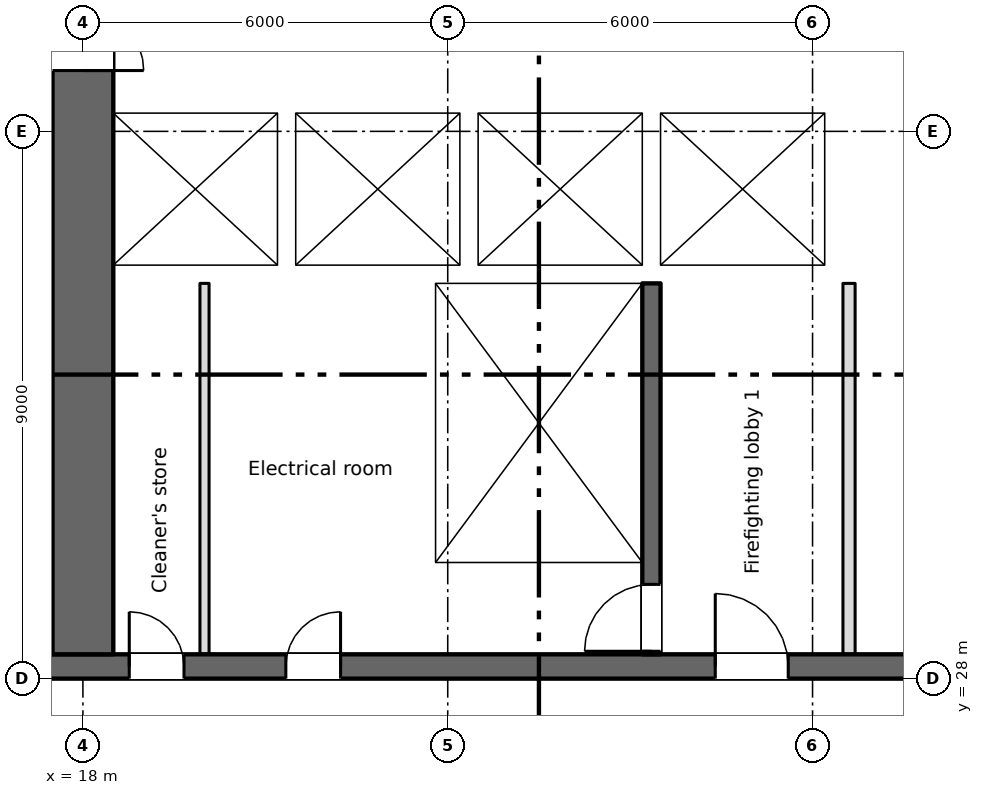
"""IFC4 building model, lengths in metres.
Left out: names, types, materials, properties, quantities, classifications, styles, units other than length and angle.
Written with IfcOpenShell. Run it as: python <this file> out.ifc"""

import sys

from ifc_helpers import new_model, si_unit, direction, frame, frame_2d, origin, place, context, subcontext, project, spatial, rectangle, extrude, element, fill, save


model = new_model("IFC4")
c1 = context("Model", 3, precision=1e-05, world=origin(), true_north=direction((0.0, 1.0)))
c2 = subcontext(c1, "Body", "Model", "MODEL_VIEW")
j1 = project(units=[si_unit("LENGTHUNIT", "METRE"), si_unit("PLANEANGLEUNIT", "RADIAN")], contexts=[c1])
p1 = place(None, origin())
s1 = spatial("IfcSite", under=j1, at=p1, CompositionType="ELEMENT")
p2 = place(p1, origin())
s2 = spatial("IfcBuilding", under=s1, at=p2, CompositionType="ELEMENT")
p3 = place(p2, frame((0.0, 0.0, 78.75)))
s3 = spatial("IfcBuildingStorey", under=s2, at=p3, CompositionType="ELEMENT", Elevation=78.75)
p4 = place(p3, frame((6.7, 28.2, 0.0), z_axis=(0.0, 0.0, 1.0), x_axis=(1.0, 0.0, 0.0)))
e1 = element("IfcWall", 1, at=p4, inside=s3, PredefinedType="SHEAR", context=c2, shape_type="SweptSolid", body=[
    extrude(rectangle(XDim=57.8, YDim=0.4, at=frame_2d((28.9, 0.0))), origin(), (0.0, 0.0, 1.0), 3.35),
])
p5 = place(p4, frame((12.062, 0.0, 0.0)))
e2 = element("IfcOpeningElement", 2, at=p5, cuts=e1, PredefinedType="OPENING", context=c2, shape_type="SweptSolid", body=[
    extrude(rectangle(XDim=0.9, YDim=2.1, at=frame_2d((0.45, 1.05))), frame((0.0, 0.21, 0.0), z_axis=(0.0, -1.0, 0.0), x_axis=(1.0, 0.0, 0.0)), (0.0, 0.0, 1.0), 0.42),
])
p6 = place(p4, frame((14.637, 0.0, 0.0)))
e3 = element("IfcOpeningElement", 3, at=p6, cuts=e1, PredefinedType="OPENING", context=c2, shape_type="SweptSolid", body=[
    extrude(rectangle(XDim=0.9, YDim=2.1, at=frame_2d((0.45, 1.05))), frame((0.0, 0.21, 0.0), z_axis=(0.0, -1.0, 0.0), x_axis=(1.0, 0.0, 0.0)), (0.0, 0.0, 1.0), 0.42),
])
p7 = place(p4, frame((49.062, 0.0, 0.0)))
e4 = element("IfcOpeningElement", 4, at=p7, cuts=e1, PredefinedType="OPENING", context=c2, shape_type="SweptSolid", body=[
    extrude(rectangle(XDim=0.9, YDim=2.1, at=frame_2d((0.45, 1.05))), frame((0.0, 0.21, 0.0), z_axis=(0.0, -1.0, 0.0), x_axis=(1.0, 0.0, 0.0)), (0.0, 0.0, 1.0), 0.42),
])
p8 = place(p4, frame((51.637, 0.0, 0.0)))
e5 = element("IfcOpeningElement", 5, at=p8, cuts=e1, PredefinedType="OPENING", context=c2, shape_type="SweptSolid", body=[
    extrude(rectangle(XDim=0.9, YDim=2.1, at=frame_2d((0.45, 1.05))), frame((0.0, 0.21, 0.0), z_axis=(0.0, -1.0, 0.0), x_axis=(1.0, 0.0, 0.0)), (0.0, 0.0, 1.0), 0.42),
])
p9 = place(p4, frame((1.35, 0.0, 0.0)))
e6 = element("IfcOpeningElement", 6, at=p9, cuts=e1, PredefinedType="OPENING", context=c2, shape_type="SweptSolid", body=[
    extrude(rectangle(XDim=0.9, YDim=2.1, at=frame_2d((0.45, 1.05))), frame((0.0, 0.21, 0.0), z_axis=(0.0, -1.0, 0.0), x_axis=(1.0, 0.0, 0.0)), (0.0, 0.0, 1.0), 0.42),
])
p10 = place(p4, frame((4.7, 0.0, 0.0)))
e7 = element("IfcOpeningElement", 7, at=p10, cuts=e1, PredefinedType="OPENING", context=c2, shape_type="SweptSolid", body=[
    extrude(rectangle(XDim=1.2, YDim=2.1, at=frame_2d((0.6, 1.05))), frame((0.0, 0.21, 0.0), z_axis=(0.0, -1.0, 0.0), x_axis=(1.0, 0.0, 0.0)), (0.0, 0.0, 1.0), 0.42),
])
p11 = place(p4, frame((31.7, 0.0, 0.0)))
e8 = element("IfcOpeningElement", 8, at=p11, cuts=e1, PredefinedType="OPENING", context=c2, shape_type="SweptSolid", body=[
    extrude(rectangle(XDim=1.2, YDim=2.1, at=frame_2d((0.6, 1.05))), frame((0.0, 0.21, 0.0), z_axis=(0.0, -1.0, 0.0), x_axis=(1.0, 0.0, 0.0)), (0.0, 0.0, 1.0), 0.42),
])
p12 = place(p4, frame((55.2, 0.0, 0.0)))
e9 = element("IfcOpeningElement", 9, at=p12, cuts=e1, PredefinedType="OPENING", context=c2, shape_type="SweptSolid", body=[
    extrude(rectangle(XDim=1.2, YDim=2.1, at=frame_2d((0.6, 1.05))), frame((0.0, 0.21, 0.0), z_axis=(0.0, -1.0, 0.0), x_axis=(1.0, 0.0, 0.0)), (0.0, 0.0, 1.0), 0.42),
])
p13 = place(p4, frame((21.7, 0.0, 0.0)))
e10 = element("IfcOpeningElement", 10, at=p13, cuts=e1, PredefinedType="OPENING", context=c2, shape_type="SweptSolid", body=[
    extrude(rectangle(XDim=1.2, YDim=2.1, at=frame_2d((0.6, 1.05))), frame((0.0, 0.21, 0.0), z_axis=(0.0, -1.0, 0.0), x_axis=(1.0, 0.0, 0.0)), (0.0, 0.0, 1.0), 0.42),
])
p14 = place(p4, frame((41.7, 0.0, 0.0)))
e11 = element("IfcOpeningElement", 11, at=p14, cuts=e1, PredefinedType="OPENING", context=c2, shape_type="SweptSolid", body=[
    extrude(rectangle(XDim=1.2, YDim=2.1, at=frame_2d((0.6, 1.05))), frame((0.0, 0.21, 0.0), z_axis=(0.0, -1.0, 0.0), x_axis=(1.0, 0.0, 0.0)), (0.0, 0.0, 1.0), 0.42),
])
p15 = place(p4, frame((24.85, 0.0, 0.0)))
e12 = element("IfcOpeningElement", 12, at=p15, cuts=e1, PredefinedType="OPENING", context=c2, shape_type="SweptSolid", body=[
    extrude(rectangle(XDim=2.4, YDim=2.1, at=frame_2d((1.2, 1.05))), frame((0.0, 0.21, 0.0), z_axis=(0.0, -1.0, 0.0), x_axis=(1.0, 0.0, 0.0)), (0.0, 0.0, 1.0), 0.42),
])
p16 = place(p4, frame((37.35, 0.0, 0.0)))
e13 = element("IfcOpeningElement", 13, at=p16, cuts=e1, PredefinedType="OPENING", context=c2, shape_type="SweptSolid", body=[
    extrude(rectangle(XDim=2.4, YDim=2.1, at=frame_2d((1.2, 1.05))), frame((0.0, 0.21, 0.0), z_axis=(0.0, -1.0, 0.0), x_axis=(1.0, 0.0, 0.0)), (0.0, 0.0, 1.0), 0.42),
])
p17 = place(p4, frame((7.85, 0.0, 0.0)))
e14 = element("IfcOpeningElement", 14, at=p17, cuts=e1, PredefinedType="OPENING", context=c2, shape_type="SweptSolid", body=[
    extrude(rectangle(XDim=2.4, YDim=2.1, at=frame_2d((1.2, 1.05))), frame((0.0, 0.21, 0.0), z_axis=(0.0, -1.0, 0.0), x_axis=(1.0, 0.0, 0.0)), (0.0, 0.0, 1.0), 0.42),
])
p18 = place(p4, frame((28.85, 0.0, 0.0)))
e15 = element("IfcOpeningElement", 15, at=p18, cuts=e1, PredefinedType="OPENING", context=c2, shape_type="SweptSolid", body=[
    extrude(rectangle(XDim=0.9, YDim=2.1, at=frame_2d((0.45, 1.05))), frame((0.0, 0.21, 0.0), z_axis=(0.0, -1.0, 0.0), x_axis=(1.0, 0.0, 0.0)), (0.0, 0.0, 1.0), 0.42),
])
p19 = place(p4, frame((34.85, 0.0, 0.0)))
e16 = element("IfcOpeningElement", 16, at=p19, cuts=e1, PredefinedType="OPENING", context=c2, shape_type="SweptSolid", body=[
    extrude(rectangle(XDim=0.9, YDim=2.1, at=frame_2d((0.45, 1.05))), frame((0.0, 0.21, 0.0), z_axis=(0.0, -1.0, 0.0), x_axis=(1.0, 0.0, 0.0)), (0.0, 0.0, 1.0), 0.42),
])
p20 = place(p3, frame((18.0, 28.4, 0.0), z_axis=(0.0, 0.0, 1.0), x_axis=(0.0, 1.0, 0.0)))
e17 = element("IfcWall", 17, at=p20, inside=s3, PredefinedType="SHEAR", context=c2, shape_type="SweptSolid", body=[
    extrude(rectangle(XDim=16.6, YDim=1.0, at=frame_2d((8.3, 0.0))), origin(), (0.0, 0.0, 1.0), 3.35),
])
p21 = place(p20, frame((9.6, 0.0, 0.0)))
e18 = element("IfcOpeningElement", 18, at=p21, cuts=e17, PredefinedType="OPENING", context=c2, shape_type="SweptSolid", body=[
    extrude(rectangle(XDim=2.0, YDim=2.1, at=frame_2d((1.0, 1.05))), frame((0.0, 0.51, 0.0), z_axis=(0.0, -1.0, 0.0), x_axis=(1.0, 0.0, 0.0)), (0.0, 0.0, 1.0), 1.02),
])
p22 = place(p20, frame((15.25, 0.0, 0.0)))
e19 = element("IfcOpeningElement", 19, at=p22, cuts=e17, PredefinedType="OPENING", context=c2, shape_type="SweptSolid", body=[
    extrude(rectangle(XDim=1.2, YDim=2.1, at=frame_2d((0.6, 1.05))), frame((0.0, 0.51, 0.0), z_axis=(0.0, -1.0, 0.0), x_axis=(1.0, 0.0, 0.0)), (0.0, 0.0, 1.0), 1.02),
])
p23 = place(p3, frame((23.65, 28.4, 0.0), z_axis=(0.0, 0.0, 1.0), x_axis=(0.0, 1.0, 0.0)))
e20 = element("IfcWall", 20, at=p23, inside=s3, PredefinedType="SHEAR", context=c2, shape_type="SweptSolid", body=[
    extrude(rectangle(XDim=6.1, YDim=0.3, at=frame_2d((3.05, 0.0))), origin(), (0.0, 0.0, 1.0), 3.35),
])
p24 = place(p3, frame((27.35, 28.4, 0.0), z_axis=(0.0, 0.0, 1.0), x_axis=(0.0, 1.0, 0.0)))
e21 = element("IfcWall", 21, at=p24, inside=s3, PredefinedType="SHEAR", context=c2, shape_type="SweptSolid", body=[
    extrude(rectangle(XDim=6.1, YDim=0.3, at=frame_2d((3.05, 0.0))), origin(), (0.0, 0.0, 1.0), 3.35),
])
p25 = place(p24, frame((0.05, 0.0, 0.0)))
e22 = element("IfcOpeningElement", 22, at=p25, cuts=e21, PredefinedType="OPENING", context=c2, shape_type="SweptSolid", body=[
    extrude(rectangle(XDim=1.1, YDim=2.1, at=frame_2d((0.55, 1.05))), frame((0.0, 0.16, 0.0), z_axis=(0.0, -1.0, 0.0), x_axis=(1.0, 0.0, 0.0)), (0.0, 0.0, 1.0), 0.32),
])
p26 = place(p3, frame((18.5, 34.65, 0.0), z_axis=(0.0, 0.0, 1.0), x_axis=(1.0, 0.0, 0.0)))
e23 = element("IfcWall", 23, at=p26, inside=s3, PredefinedType="SHEAR", context=c2, shape_type="SweptSolid", body=[
    extrude(rectangle(XDim=12.2, YDim=0.3, at=frame_2d((6.1, 0.0))), origin(), (0.0, 0.0, 1.0), 3.35),
])
p27 = place(p26, frame((9.8, 0.0, 0.0)))
e24 = element("IfcOpeningElement", 24, at=p27, cuts=e23, PredefinedType="OPENING", context=c2, shape_type="SweptSolid", body=[
    extrude(rectangle(XDim=1.1, YDim=2.1, at=frame_2d((0.55, 1.05))), frame((0.0, 0.16, 0.0), z_axis=(0.0, -1.0, 0.0), x_axis=(1.0, 0.0, 0.0)), (0.0, 0.0, 1.0), 0.32),
])
p28 = place(p3, frame((18.5, 37.45, 0.0), z_axis=(0.0, 0.0, 1.0), x_axis=(1.0, 0.0, 0.0)))
e25 = element("IfcWall", 25, at=p28, inside=s3, PredefinedType="SHEAR", context=c2, shape_type="SweptSolid", body=[
    extrude(rectangle(XDim=12.2, YDim=0.3, at=frame_2d((6.1, 0.0))), origin(), (0.0, 0.0, 1.0), 3.35),
])
p29 = place(p28, frame((0.8, 0.0, 0.0)))
e26 = element("IfcOpeningElement", 26, at=p29, cuts=e25, PredefinedType="OPENING", context=c2, shape_type="SweptSolid", body=[
    extrude(rectangle(XDim=1.1, YDim=2.1, at=frame_2d((0.55, 1.05))), frame((0.0, 0.16, 0.0), z_axis=(0.0, -1.0, 0.0), x_axis=(1.0, 0.0, 0.0)), (0.0, 0.0, 1.0), 0.32),
])
p30 = place(p28, frame((3.8, 0.0, 0.0)))
e27 = element("IfcOpeningElement", 27, at=p30, cuts=e25, PredefinedType="OPENING", context=c2, shape_type="SweptSolid", body=[
    extrude(rectangle(XDim=1.1, YDim=2.1, at=frame_2d((0.55, 1.05))), frame((0.0, 0.16, 0.0), z_axis=(0.0, -1.0, 0.0), x_axis=(1.0, 0.0, 0.0)), (0.0, 0.0, 1.0), 0.32),
])
p31 = place(p28, frame((6.8, 0.0, 0.0)))
e28 = element("IfcOpeningElement", 28, at=p31, cuts=e25, PredefinedType="OPENING", context=c2, shape_type="SweptSolid", body=[
    extrude(rectangle(XDim=1.1, YDim=2.1, at=frame_2d((0.55, 1.05))), frame((0.0, 0.16, 0.0), z_axis=(0.0, -1.0, 0.0), x_axis=(1.0, 0.0, 0.0)), (0.0, 0.0, 1.0), 0.32),
])
p32 = place(p3, frame((27.35, 34.8, 0.0), z_axis=(0.0, 0.0, 1.0), x_axis=(0.0, 1.0, 0.0)))
e29 = element("IfcWall", 29, at=p32, inside=s3, PredefinedType="SHEAR", context=c2, shape_type="SweptSolid", body=[
    extrude(rectangle(XDim=2.5, YDim=0.3, at=frame_2d((1.25, 0.0))), origin(), (0.0, 0.0, 1.0), 3.35),
])
p33 = place(p3, frame((30.45, 34.8, 0.0), z_axis=(0.0, 0.0, 1.0), x_axis=(0.0, 1.0, 0.0)))
e30 = element("IfcWall", 30, at=p33, inside=s3, PredefinedType="SHEAR", context=c2, shape_type="SweptSolid", body=[
    extrude(rectangle(XDim=2.5, YDim=0.5, at=frame_2d((1.25, 0.0))), origin(), (0.0, 0.0, 1.0), 3.35),
])
for number, where, z_axis, x_axis in (
    (31, (21.35, 34.8, 0.0), (0.0, 0.0, 1.0), (0.0, 1.0, 0.0)),
    (32, (24.35, 34.8, 0.0), (0.0, 0.0, 1.0), (0.0, 1.0, 0.0)),
):
    element("IfcWall", number, at=place(p3, frame(where, z_axis=z_axis, x_axis=x_axis)), inside=s3, PredefinedType="SHEAR", context=c2, shape_type="SweptSolid", body=[
        extrude(rectangle(XDim=2.5, YDim=0.3, at=frame_2d((1.25, 0.0))), origin(), (0.0, 0.0, 1.0), 3.35),
    ])
p34 = place(p3, frame((30.6, 28.4, 0.0), z_axis=(0.0, 0.0, 1.0), x_axis=(0.0, 1.0, 0.0)))
e33 = element("IfcWall", 33, at=p34, inside=s3, PredefinedType="PARTITIONING", context=c2, shape_type="SweptSolid", body=[
    extrude(rectangle(XDim=6.1, YDim=0.2, at=frame_2d((3.05, 0.0))), origin(), (0.0, 0.0, 1.0), 3.35),
])
p35 = place(p3, frame((20.0, 28.4, 0.0), z_axis=(0.0, 0.0, 1.0), x_axis=(0.0, 1.0, 0.0)))
e34 = element("IfcWall", 34, at=p35, inside=s3, PredefinedType="PARTITIONING", context=c2, shape_type="SweptSolid", body=[
    extrude(rectangle(XDim=6.1, YDim=0.15, at=frame_2d((3.05, 0.0))), origin(), (0.0, 0.0, 1.0), 3.35),
])
p36 = place(p5, origin())
e35 = element("IfcDoor", 35, at=p36, inside=s3, OperationType="SINGLE_SWING_LEFT", PredefinedType="DOOR", context=c2, shape_type="SweptSolid", body=[
    extrude(rectangle(XDim=0.9, YDim=2.1, at=frame_2d((0.45, 1.05))), frame((0.0, 0.025, 0.0), z_axis=(0.0, -1.0, 0.0), x_axis=(1.0, 0.0, 0.0)), (0.0, 0.0, 1.0), 0.05),
])
fill(e2, e35)
p37 = place(p6, origin())
e36 = element("IfcDoor", 36, at=p37, inside=s3, OperationType="SINGLE_SWING_RIGHT", PredefinedType="DOOR", context=c2, shape_type="SweptSolid", body=[
    extrude(rectangle(XDim=0.9, YDim=2.1, at=frame_2d((0.45, 1.05))), frame((0.0, 0.025, 0.0), z_axis=(0.0, -1.0, 0.0), x_axis=(1.0, 0.0, 0.0)), (0.0, 0.0, 1.0), 0.05),
])
fill(e3, e36)
p38 = place(p29, origin())
e37 = element("IfcDoor", 37, at=p38, inside=s3, OperationType="SLIDING_TO_LEFT", PredefinedType="DOOR", context=c2, shape_type="SweptSolid", body=[
    extrude(rectangle(XDim=1.1, YDim=2.1, at=frame_2d((0.55, 1.05))), frame((0.0, 0.025, 0.0), z_axis=(0.0, -1.0, 0.0), x_axis=(1.0, 0.0, 0.0)), (0.0, 0.0, 1.0), 0.05),
])
fill(e26, e37)
p39 = place(p30, origin())
e38 = element("IfcDoor", 38, at=p39, inside=s3, OperationType="SLIDING_TO_LEFT", PredefinedType="DOOR", context=c2, shape_type="SweptSolid", body=[
    extrude(rectangle(XDim=1.1, YDim=2.1, at=frame_2d((0.55, 1.05))), frame((0.0, 0.025, 0.0), z_axis=(0.0, -1.0, 0.0), x_axis=(1.0, 0.0, 0.0)), (0.0, 0.0, 1.0), 0.05),
])
fill(e27, e38)
p40 = place(p31, origin())
e39 = element("IfcDoor", 39, at=p40, inside=s3, OperationType="SLIDING_TO_LEFT", PredefinedType="DOOR", context=c2, shape_type="SweptSolid", body=[
    extrude(rectangle(XDim=1.1, YDim=2.1, at=frame_2d((0.55, 1.05))), frame((0.0, 0.025, 0.0), z_axis=(0.0, -1.0, 0.0), x_axis=(1.0, 0.0, 0.0)), (0.0, 0.0, 1.0), 0.05),
])
fill(e28, e39)
p41 = place(p27, origin())
e40 = element("IfcDoor", 40, at=p41, inside=s3, OperationType="SLIDING_TO_LEFT", PredefinedType="DOOR", context=c2, shape_type="SweptSolid", body=[
    extrude(rectangle(XDim=1.1, YDim=2.1, at=frame_2d((0.55, 1.05))), frame((0.0, 0.025, 0.0), z_axis=(0.0, -1.0, 0.0), x_axis=(1.0, 0.0, 0.0)), (0.0, 0.0, 1.0), 0.05),
])
fill(e24, e40)
p42 = place(p25, origin())
e41 = element("IfcDoor", 41, at=p42, inside=s3, OperationType="SINGLE_SWING_LEFT", PredefinedType="DOOR", context=c2, shape_type="SweptSolid", body=[
    extrude(rectangle(XDim=1.1, YDim=2.1, at=frame_2d((0.55, 1.05))), frame((0.0, 0.025, 0.0), z_axis=(0.0, -1.0, 0.0), x_axis=(1.0, 0.0, 0.0)), (0.0, 0.0, 1.0), 0.05),
])
fill(e22, e41)
p43 = place(p13, origin())
e42 = element("IfcDoor", 42, at=p43, inside=s3, OperationType="SINGLE_SWING_LEFT", PredefinedType="DOOR", context=c2, shape_type="SweptSolid", body=[
    extrude(rectangle(XDim=1.2, YDim=2.1, at=frame_2d((0.6, 1.05))), frame((0.0, 0.025, 0.0), z_axis=(0.0, -1.0, 0.0), x_axis=(1.0, 0.0, 0.0)), (0.0, 0.0, 1.0), 0.05),
])
fill(e10, e42)
p44 = place(p21, origin())
e43 = element("IfcDoor", 43, at=p44, inside=s3, OperationType="DOUBLE_DOOR_SINGLE_SWING", PredefinedType="DOOR", context=c2, shape_type="SweptSolid", body=[
    extrude(rectangle(XDim=2.0, YDim=2.1, at=frame_2d((1.0, 1.05))), frame((0.0, 0.025, 0.0), z_axis=(0.0, -1.0, 0.0), x_axis=(1.0, 0.0, 0.0)), (0.0, 0.0, 1.0), 0.05),
])
fill(e18, e43)
save(model, sys.argv[1])
